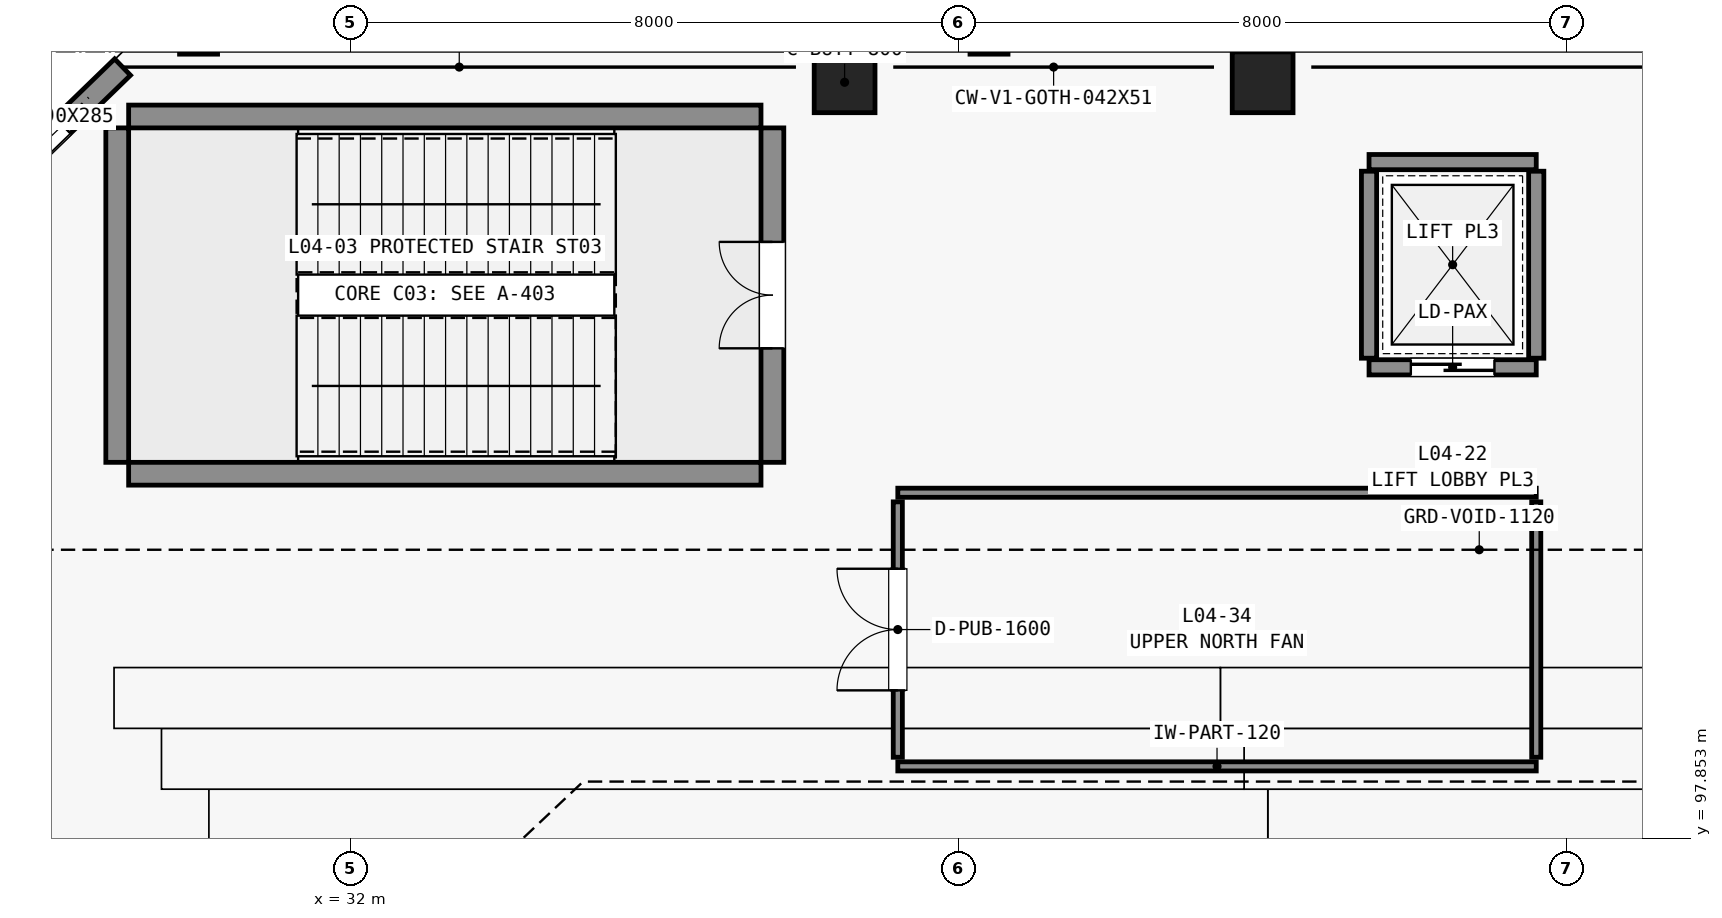
"""IFC4 building model, lengths in metres.
Left out: names, types, materials, properties, quantities, classifications, styles, units other than length and angle.
Written with IfcOpenShell. Run it as: python <this file> out.ifc"""

import sys

from ifc_helpers import new_model, si_unit, direction, frame, frame_2d, origin, origin_2d, place, context, subcontext, project, spatial, rectangle, extrude, element, fill, save


model = new_model("IFC4")
c1 = context("Model", 3, precision=1e-05, world=origin(), true_north=direction((0.0, 1.0)))
c2 = subcontext(c1, "Body", "Model", "MODEL_VIEW")
j1 = project(units=[si_unit("LENGTHUNIT", "METRE"), si_unit("PLANEANGLEUNIT", "RADIAN")], contexts=[c1])
p1 = place(None, origin())
s1 = spatial("IfcSite", under=j1, at=p1, CompositionType="ELEMENT")
p2 = place(p1, origin())
s2 = spatial("IfcBuilding", under=s1, at=p2, CompositionType="ELEMENT")
p3 = place(p2, frame((0.0, 0.0, 21.0)))
s3 = spatial("IfcBuildingStorey", under=s2, at=p3, CompositionType="ELEMENT", Elevation=21.0)
for number, where, z_axis, x_axis in (
    (1, (38.5, 107.8, 0.0), (0.0, 0.0, 1.0), (1.0, 0.0, 0.0)),
    (2, (44.0, 107.8, 0.0), (0.0, 0.0, 1.0), (1.0, 0.0, 0.0)),
):
    element("IfcColumn", number, at=place(p3, frame(where, z_axis=z_axis, x_axis=x_axis)), inside=s3, PredefinedType="PILASTER", context=c2, shape_type="SweptSolid", body=[
        extrude(rectangle(XDim=0.8, YDim=0.8, at=origin_2d()), origin(), (0.0, 0.0, 1.0), 5.06),
    ])
for number, where, z_axis, x_axis in (
    (3, (30.0, 108.42, -0.34), (0.0, 0.0, 1.0), (1.0, 0.0, 0.0)),
    (4, (40.4, 108.42, -0.34), (0.0, 0.0, 1.0), (1.0, 0.0, 0.0)),
):
    element("IfcColumn", number, at=place(p3, frame(where, z_axis=z_axis, x_axis=x_axis)), inside=s3, PredefinedType="PILASTER", context=c2, shape_type="SweptSolid", body=[
        extrude(rectangle(XDim=0.5, YDim=0.5, at=origin_2d()), origin(), (0.0, 0.0, 1.0), 1.69),
    ])
for number, where, z_axis, x_axis in (
    (5, (29.08, 102.65, 0.0), (0.0, 0.0, 1.0), (1.0, 0.0, 0.0)),
    (6, (29.08, 107.35, 0.0), (0.0, 0.0, 1.0), (1.0, 0.0, 0.0)),
):
    element("IfcWall", number, at=place(p3, frame(where, z_axis=z_axis, x_axis=x_axis)), inside=s3, PredefinedType="SHEAR", context=c2, shape_type="SweptSolid", body=[
        extrude(rectangle(XDim=8.32, YDim=0.3, at=frame_2d((4.16, 0.0))), origin(), (0.0, 0.0, 1.0), 5.4),
    ])
p4 = place(p3, frame((28.93, 102.8, 0.0), z_axis=(0.0, 0.0, 1.0), x_axis=(0.0, 1.0, 0.0)))
e7 = element("IfcWall", 7, at=p4, inside=s3, PredefinedType="SHEAR", context=c2, shape_type="SweptSolid", body=[
    extrude(rectangle(XDim=4.4, YDim=0.3, at=frame_2d((2.2, 0.0))), origin(), (0.0, 0.0, 1.0), 5.4),
])
p5 = place(p3, frame((37.55, 102.8, 0.0), z_axis=(0.0, 0.0, 1.0), x_axis=(0.0, 1.0, 0.0)))
e8 = element("IfcWall", 8, at=p5, inside=s3, PredefinedType="SHEAR", context=c2, shape_type="SweptSolid", body=[
    extrude(rectangle(XDim=4.4, YDim=0.3, at=frame_2d((2.2, 0.0))), origin(), (0.0, 0.0, 1.0), 5.4),
])
p6 = place(p5, frame((1.5, 0.0, 0.0)))
e9 = element("IfcOpeningElement", 9, at=p6, cuts=e8, PredefinedType="OPENING", context=c2, shape_type="SweptSolid", body=[
    extrude(rectangle(XDim=1.4, YDim=2.2, at=frame_2d((0.7, 1.1))), frame((0.0, 0.16, 0.0), z_axis=(0.0, -1.0, 0.0), x_axis=(1.0, 0.0, 0.0)), (0.0, 0.0, 1.0), 0.32),
])
p7 = place(p3, frame((45.4, 104.05, 0.0), z_axis=(0.0, 0.0, 1.0), x_axis=(1.0, 0.0, 0.0)))
e10 = element("IfcWall", 10, at=p7, inside=s3, PredefinedType="STANDARD", context=c2, shape_type="SweptSolid", body=[
    extrude(rectangle(XDim=2.2, YDim=0.2, at=frame_2d((1.1, 0.0))), origin(), (0.0, 0.0, 1.0), 5.06),
])
p8 = place(p7, frame((0.55, 0.0, 0.0)))
e11 = element("IfcOpeningElement", 11, at=p8, cuts=e10, PredefinedType="OPENING", context=c2, shape_type="SweptSolid", body=[
    extrude(rectangle(XDim=1.1, YDim=2.15, at=frame_2d((0.55, 1.075))), frame((0.0, 0.11, 0.0), z_axis=(0.0, -1.0, 0.0), x_axis=(1.0, 0.0, 0.0)), (0.0, 0.0, 1.0), 0.22),
])
p9 = place(p3, frame((45.4, 106.75, 0.0), z_axis=(0.0, 0.0, 1.0), x_axis=(1.0, 0.0, 0.0)))
e12 = element("IfcWall", 12, at=p9, inside=s3, PredefinedType="STANDARD", context=c2, shape_type="SweptSolid", body=[
    extrude(rectangle(XDim=2.2, YDim=0.2, at=frame_2d((1.1, 0.0))), origin(), (0.0, 0.0, 1.0), 5.06),
])
for number, where, z_axis, x_axis in (
    (13, (45.4, 104.17, 0.0), (0.0, 0.0, 1.0), (0.0, 1.0, 0.0)),
    (14, (47.6, 104.17, 0.0), (0.0, 0.0, 1.0), (0.0, 1.0, 0.0)),
):
    element("IfcWall", number, at=place(p3, frame(where, z_axis=z_axis, x_axis=x_axis)), inside=s3, PredefinedType="STANDARD", context=c2, shape_type="SweptSolid", body=[
        extrude(rectangle(XDim=2.46, YDim=0.2, at=frame_2d((1.23, 0.0))), origin(), (0.0, 0.0, 1.0), 5.06),
    ])
p10 = place(p3, frame((29.0, 108.0, 0.0), z_axis=(0.0, 0.0, 1.0), x_axis=(-0.718244287729, -0.695791019736, 0.0)))
e15 = element("IfcWall", 15, at=p10, inside=s3, PredefinedType="STANDARD", context=c2, shape_type="SweptSolid", body=[
    extrude(rectangle(XDim=17.821, YDim=0.3, at=frame_2d((8.911, 0.0))), origin(), (0.0, 0.0, 1.0), 4.21),
])
p11 = place(p10, frame((1.1, 0.0, 0.95)))
e16 = element("IfcOpeningElement", 16, at=p11, cuts=e15, PredefinedType="OPENING", context=c2, shape_type="SweptSolid", body=[
    extrude(rectangle(XDim=0.9, YDim=2.85, at=frame_2d((0.45, 1.425))), frame((0.0, 0.16, 0.0), z_axis=(0.0, -1.0, 0.0), x_axis=(1.0, 0.0, 0.0)), (0.0, 0.0, 1.0), 0.32),
])
p12 = place(p10, frame((2.45, 0.0, 0.95)))
e17 = element("IfcOpeningElement", 17, at=p12, cuts=e15, PredefinedType="OPENING", context=c2, shape_type="SweptSolid", body=[
    extrude(rectangle(XDim=0.9, YDim=2.85, at=frame_2d((0.45, 1.425))), frame((0.0, 0.16, 0.0), z_axis=(0.0, -1.0, 0.0), x_axis=(1.0, 0.0, 0.0)), (0.0, 0.0, 1.0), 0.32),
])
p13 = place(p10, frame((4.3, 0.0, 0.95)))
e18 = element("IfcOpeningElement", 18, at=p13, cuts=e15, PredefinedType="OPENING", context=c2, shape_type="SweptSolid", body=[
    extrude(rectangle(XDim=0.9, YDim=2.85, at=frame_2d((0.45, 1.425))), frame((0.0, 0.16, 0.0), z_axis=(0.0, -1.0, 0.0), x_axis=(1.0, 0.0, 0.0)), (0.0, 0.0, 1.0), 0.32),
])
p14 = place(p10, frame((5.65, 0.0, 0.95)))
e19 = element("IfcOpeningElement", 19, at=p14, cuts=e15, PredefinedType="OPENING", context=c2, shape_type="SweptSolid", body=[
    extrude(rectangle(XDim=0.9, YDim=2.85, at=frame_2d((0.45, 1.425))), frame((0.0, 0.16, 0.0), z_axis=(0.0, -1.0, 0.0), x_axis=(1.0, 0.0, 0.0)), (0.0, 0.0, 1.0), 0.32),
])
p15 = place(p10, frame((7.5, 0.0, 0.95)))
e20 = element("IfcOpeningElement", 20, at=p15, cuts=e15, PredefinedType="OPENING", context=c2, shape_type="SweptSolid", body=[
    extrude(rectangle(XDim=0.9, YDim=2.85, at=frame_2d((0.45, 1.425))), frame((0.0, 0.16, 0.0), z_axis=(0.0, -1.0, 0.0), x_axis=(1.0, 0.0, 0.0)), (0.0, 0.0, 1.0), 0.32),
])
p16 = place(p10, frame((8.85, 0.0, 0.95)))
e21 = element("IfcOpeningElement", 21, at=p16, cuts=e15, PredefinedType="OPENING", context=c2, shape_type="SweptSolid", body=[
    extrude(rectangle(XDim=0.9, YDim=2.85, at=frame_2d((0.45, 1.425))), frame((0.0, 0.16, 0.0), z_axis=(0.0, -1.0, 0.0), x_axis=(1.0, 0.0, 0.0)), (0.0, 0.0, 1.0), 0.32),
])
p17 = place(p10, frame((10.7, 0.0, 0.95)))
e22 = element("IfcOpeningElement", 22, at=p17, cuts=e15, PredefinedType="OPENING", context=c2, shape_type="SweptSolid", body=[
    extrude(rectangle(XDim=0.9, YDim=2.85, at=frame_2d((0.45, 1.425))), frame((0.0, 0.16, 0.0), z_axis=(0.0, -1.0, 0.0), x_axis=(1.0, 0.0, 0.0)), (0.0, 0.0, 1.0), 0.32),
])
p18 = place(p10, frame((12.05, 0.0, 0.95)))
e23 = element("IfcOpeningElement", 23, at=p18, cuts=e15, PredefinedType="OPENING", context=c2, shape_type="SweptSolid", body=[
    extrude(rectangle(XDim=0.9, YDim=2.85, at=frame_2d((0.45, 1.425))), frame((0.0, 0.16, 0.0), z_axis=(0.0, -1.0, 0.0), x_axis=(1.0, 0.0, 0.0)), (0.0, 0.0, 1.0), 0.32),
])
p19 = place(p10, frame((13.9, 0.0, 0.95)))
e24 = element("IfcOpeningElement", 24, at=p19, cuts=e15, PredefinedType="OPENING", context=c2, shape_type="SweptSolid", body=[
    extrude(rectangle(XDim=0.9, YDim=2.85, at=frame_2d((0.45, 1.425))), frame((0.0, 0.16, 0.0), z_axis=(0.0, -1.0, 0.0), x_axis=(1.0, 0.0, 0.0)), (0.0, 0.0, 1.0), 0.32),
])
p20 = place(p10, frame((15.25, 0.0, 0.95)))
e25 = element("IfcOpeningElement", 25, at=p20, cuts=e15, PredefinedType="OPENING", context=c2, shape_type="SweptSolid", body=[
    extrude(rectangle(XDim=0.9, YDim=2.85, at=frame_2d((0.45, 1.425))), frame((0.0, 0.16, 0.0), z_axis=(0.0, -1.0, 0.0), x_axis=(1.0, 0.0, 0.0)), (0.0, 0.0, 1.0), 0.32),
])
for number, where, z_axis, x_axis in (
    (26, (39.2, 98.8, 0.0), (0.0, 0.0, 1.0), (1.0, 0.0, 0.0)),
    (27, (39.2, 102.4, 0.0), (0.0, 0.0, 1.0), (1.0, 0.0, 0.0)),
):
    element("IfcWall", number, at=place(p3, frame(where, z_axis=z_axis, x_axis=x_axis)), inside=s3, PredefinedType="PARTITIONING", context=c2, shape_type="SweptSolid", body=[
        extrude(rectangle(XDim=8.4, YDim=0.12, at=frame_2d((4.2, 0.0))), origin(), (0.0, 0.0, 1.0), 5.06),
    ])
p21 = place(p3, frame((39.2, 98.92, 0.0), z_axis=(0.0, 0.0, 1.0), x_axis=(0.0, 1.0, 0.0)))
e28 = element("IfcWall", 28, at=p21, inside=s3, PredefinedType="PARTITIONING", context=c2, shape_type="SweptSolid", body=[
    extrude(rectangle(XDim=3.36, YDim=0.12, at=frame_2d((1.68, 0.0))), origin(), (0.0, 0.0, 1.0), 5.06),
])
p22 = place(p21, frame((0.88, 0.0, 0.0)))
e29 = element("IfcOpeningElement", 29, at=p22, cuts=e28, PredefinedType="OPENING", context=c2, shape_type="SweptSolid", body=[
    extrude(rectangle(XDim=1.6, YDim=2.25, at=frame_2d((0.8, 1.125))), frame((0.0, 0.07, 0.0), z_axis=(0.0, -1.0, 0.0), x_axis=(1.0, 0.0, 0.0)), (0.0, 0.0, 1.0), 0.14),
])
p23 = place(p3, frame((47.6, 98.92, 0.0), z_axis=(0.0, 0.0, 1.0), x_axis=(0.0, 1.0, 0.0)))
e30 = element("IfcWall", 30, at=p23, inside=s3, PredefinedType="PARTITIONING", context=c2, shape_type="SweptSolid", body=[
    extrude(rectangle(XDim=3.36, YDim=0.12, at=frame_2d((1.68, 0.0))), origin(), (0.0, 0.0, 1.0), 5.06),
])
p24 = place(p8, origin())
e31 = element("IfcDoor", 31, at=p24, inside=s3, OperationType="SLIDING_TO_LEFT", PredefinedType="DOOR", context=c2, shape_type="SweptSolid", body=[
    extrude(rectangle(XDim=1.1, YDim=2.15, at=frame_2d((0.55, 1.075))), frame((0.0, 0.025, 0.0), z_axis=(0.0, -1.0, 0.0), x_axis=(1.0, 0.0, 0.0)), (0.0, 0.0, 1.0), 0.05),
])
fill(e11, e31)
p25 = place(p11, origin())
e32 = element("IfcWindow", 32, at=p25, inside=s3, PartitioningType="DOUBLE_PANEL_VERTICAL", PredefinedType="WINDOW", context=c2, shape_type="SweptSolid", body=[
    extrude(rectangle(XDim=0.9, YDim=2.85, at=frame_2d((0.45, 1.425))), frame((0.0, 0.03, 0.0), z_axis=(0.0, -1.0, 0.0), x_axis=(1.0, 0.0, 0.0)), (0.0, 0.0, 1.0), 0.06),
])
fill(e16, e32)
p26 = place(p6, origin())
e33 = element("IfcDoor", 33, at=p26, inside=s3, OperationType="DOUBLE_DOOR_SINGLE_SWING", PredefinedType="DOOR", context=c2, shape_type="SweptSolid", body=[
    extrude(rectangle(XDim=1.4, YDim=2.2, at=frame_2d((0.7, 1.1))), frame((0.0, 0.025, 0.0), z_axis=(0.0, -1.0, 0.0), x_axis=(1.0, 0.0, 0.0)), (0.0, 0.0, 1.0), 0.05),
])
fill(e9, e33)
p27 = place(p22, origin())
e34 = element("IfcDoor", 34, at=p27, inside=s3, OperationType="DOUBLE_DOOR_SINGLE_SWING", PredefinedType="DOOR", context=c2, shape_type="SweptSolid", body=[
    extrude(rectangle(XDim=1.6, YDim=2.25, at=frame_2d((0.8, 1.125))), frame((0.0, 0.025, 0.0), z_axis=(0.0, -1.0, 0.0), x_axis=(1.0, 0.0, 0.0)), (0.0, 0.0, 1.0), 0.05),
])
fill(e29, e34)
save(model, sys.argv[1])
